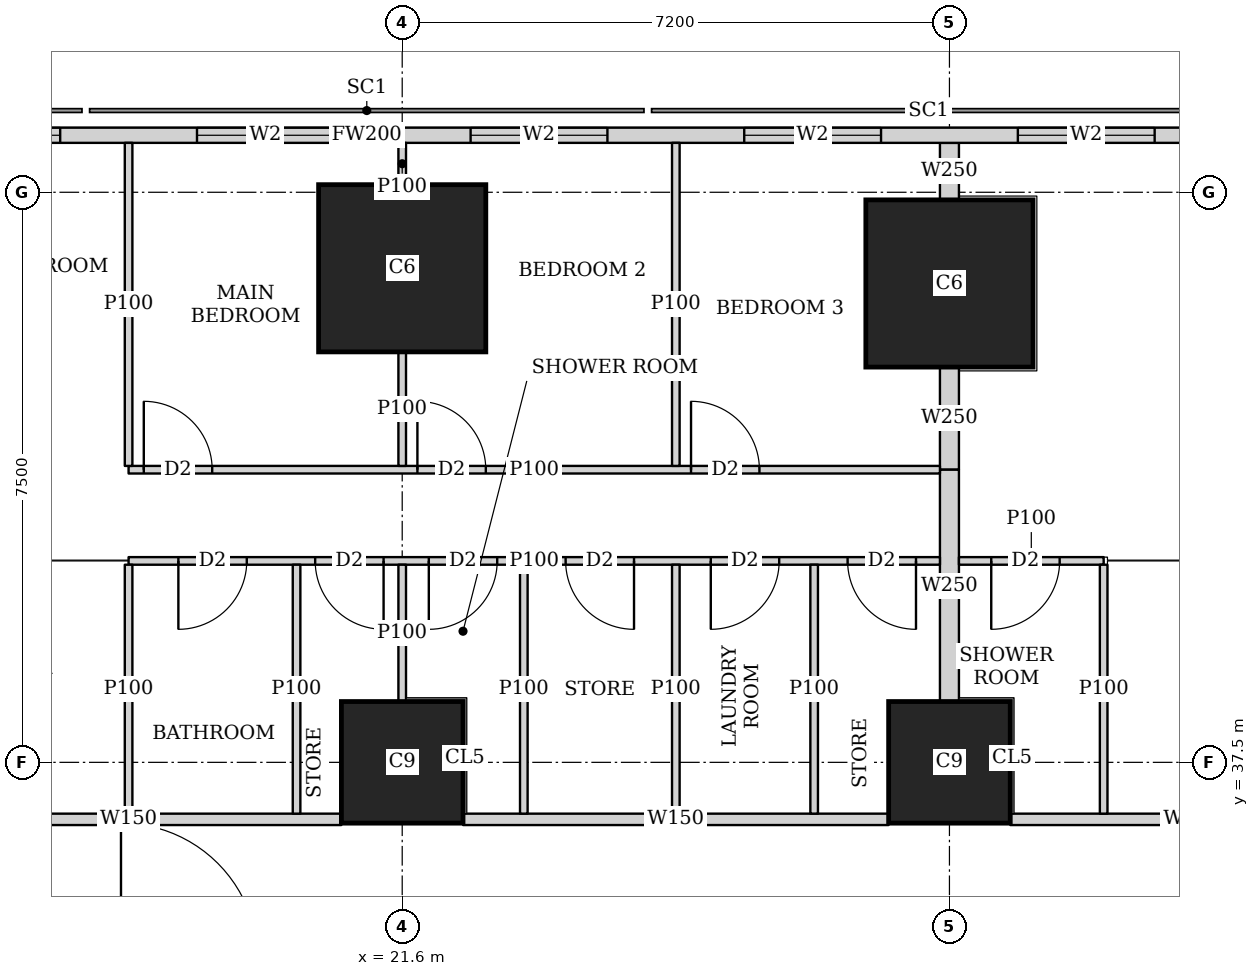
"""IFC4 building model, lengths in metres.
Left out: names, types, materials, properties, quantities, classifications, styles, units other than length and angle.
Written with IfcOpenShell. Run it as: python <this file> out.ifc"""

import sys

from ifc_helpers import new_model, si_unit, direction, frame, frame_2d, origin, origin_2d, place, context, subcontext, project, spatial, rectangle, extrude, element, fill, save


model = new_model("IFC4")
c1 = context("Model", 3, precision=1e-05, world=origin(), true_north=direction((0.0, 1.0)))
c2 = subcontext(c1, "Body", "Model", "MODEL_VIEW")
j1 = project(units=[si_unit("LENGTHUNIT", "METRE"), si_unit("PLANEANGLEUNIT", "RADIAN")], contexts=[c1])
p1 = place(None, origin())
s1 = spatial("IfcSite", under=j1, at=p1, CompositionType="ELEMENT")
p2 = place(p1, origin())
s2 = spatial("IfcBuilding", under=s1, at=p2, CompositionType="ELEMENT")
p3 = place(p2, frame((0.0, 0.0, 81.65)))
s3 = spatial("IfcBuildingStorey", under=s2, at=p3, CompositionType="ELEMENT", Elevation=81.65)
for number, where, z_axis, x_axis in (
    (1, (21.6, 37.5, 0.0), (0.0, 0.0, 1.0), (1.0, 0.0, 0.0)),
    (2, (28.8, 37.5, 0.0), (0.0, 0.0, 1.0), (1.0, 0.0, 0.0)),
):
    element("IfcColumn", number, at=place(p3, frame(where, z_axis=z_axis, x_axis=x_axis)), inside=s3, PredefinedType="COLUMN", context=c2, shape_type="SweptSolid", body=[
        extrude(rectangle(XDim=1.6, YDim=1.6, at=origin_2d()), origin(), (0.0, 0.0, 1.0), 3.75),
    ])
for number, where, z_axis, x_axis in (
    (3, (21.6, 44.0, 0.0), (0.0, 0.0, 1.0), (1.0, 0.0, 0.0)),
    (4, (28.8, 43.8, 0.0), (0.0, 0.0, 1.0), (1.0, 0.0, 0.0)),
):
    element("IfcColumn", number, at=place(p3, frame(where, z_axis=z_axis, x_axis=x_axis)), inside=s3, PredefinedType="COLUMN", context=c2, shape_type="SweptSolid", body=[
        extrude(rectangle(XDim=2.2, YDim=2.2, at=origin_2d()), origin(), (0.0, 0.0, 1.0), 3.75),
    ])
p4 = place(p3, frame((40.106, 45.75, 0.0), z_axis=(0.0, 0.0, 1.0), x_axis=(-1.0, 0.0, 0.0)))
e5 = element("IfcWall", 5, at=p4, inside=s3, PredefinedType="SOLIDWALL", context=c2, shape_type="SweptSolid", body=[
    extrude(rectangle(XDim=37.943, YDim=0.2, at=frame_2d((18.971, 0.0))), origin(), (0.0, 0.0, 1.0), 3.5),
])
p5 = place(p4, frame((8.606, 0.0, 0.9)))
e6 = element("IfcOpeningElement", 6, at=p5, cuts=e5, PredefinedType="OPENING", context=c2, shape_type="SweptSolid", body=[
    extrude(rectangle(XDim=1.8, YDim=1.5, at=frame_2d((0.9, 0.75))), frame((0.0, 0.11, 0.0), z_axis=(0.0, -1.0, 0.0), x_axis=(1.0, 0.0, 0.0)), (0.0, 0.0, 1.0), 0.22),
])
p6 = place(p4, frame((12.206, 0.0, 0.9)))
e7 = element("IfcOpeningElement", 7, at=p6, cuts=e5, PredefinedType="OPENING", context=c2, shape_type="SweptSolid", body=[
    extrude(rectangle(XDim=1.8, YDim=1.5, at=frame_2d((0.9, 0.75))), frame((0.0, 0.11, 0.0), z_axis=(0.0, -1.0, 0.0), x_axis=(1.0, 0.0, 0.0)), (0.0, 0.0, 1.0), 0.22),
])
p7 = place(p4, frame((15.806, 0.0, 0.9)))
e8 = element("IfcOpeningElement", 8, at=p7, cuts=e5, PredefinedType="OPENING", context=c2, shape_type="SweptSolid", body=[
    extrude(rectangle(XDim=1.8, YDim=1.5, at=frame_2d((0.9, 0.75))), frame((0.0, 0.11, 0.0), z_axis=(0.0, -1.0, 0.0), x_axis=(1.0, 0.0, 0.0)), (0.0, 0.0, 1.0), 0.22),
])
p8 = place(p4, frame((19.406, 0.0, 0.9)))
e9 = element("IfcOpeningElement", 9, at=p8, cuts=e5, PredefinedType="OPENING", context=c2, shape_type="SweptSolid", body=[
    extrude(rectangle(XDim=1.8, YDim=1.5, at=frame_2d((0.9, 0.75))), frame((0.0, 0.11, 0.0), z_axis=(0.0, -1.0, 0.0), x_axis=(1.0, 0.0, 0.0)), (0.0, 0.0, 1.0), 0.22),
])
p9 = place(p4, frame((23.006, 0.0, 0.9)))
e10 = element("IfcOpeningElement", 10, at=p9, cuts=e5, PredefinedType="OPENING", context=c2, shape_type="SweptSolid", body=[
    extrude(rectangle(XDim=1.8, YDim=1.5, at=frame_2d((0.9, 0.75))), frame((0.0, 0.11, 0.0), z_axis=(0.0, -1.0, 0.0), x_axis=(1.0, 0.0, 0.0)), (0.0, 0.0, 1.0), 0.22),
])
p10 = place(p4, frame((26.606, 0.0, 0.9)))
e11 = element("IfcOpeningElement", 11, at=p10, cuts=e5, PredefinedType="OPENING", context=c2, shape_type="SweptSolid", body=[
    extrude(rectangle(XDim=1.8, YDim=1.5, at=frame_2d((0.9, 0.75))), frame((0.0, 0.11, 0.0), z_axis=(0.0, -1.0, 0.0), x_axis=(1.0, 0.0, 0.0)), (0.0, 0.0, 1.0), 0.22),
])
p11 = place(p3, frame((15.201, 36.75, 0.0), z_axis=(0.0, 0.0, 1.0), x_axis=(1.0, 0.0, 0.0)))
e12 = element("IfcWall", 12, at=p11, inside=s3, PredefinedType="SOLIDWALL", context=c2, shape_type="SweptSolid", body=[
    extrude(rectangle(XDim=5.598, YDim=0.15, at=frame_2d((2.799, 0.0))), origin(), (0.0, 0.0, 1.0), 3.5),
])
p12 = place(p11, frame((0.699, 0.0, 0.0)))
e13 = element("IfcOpeningElement", 13, at=p12, cuts=e12, PredefinedType="OPENING", context=c2, shape_type="SweptSolid", body=[
    extrude(rectangle(XDim=1.0, YDim=2.1, at=frame_2d((0.5, 1.05))), frame((0.0, 0.085, 0.0), z_axis=(0.0, -1.0, 0.0), x_axis=(1.0, 0.0, 0.0)), (0.0, 0.0, 1.0), 0.17),
])
p13 = place(p3, frame((22.401, 36.75, 0.0), z_axis=(0.0, 0.0, 1.0), x_axis=(1.0, 0.0, 0.0)))
e14 = element("IfcWall", 14, at=p13, inside=s3, PredefinedType="SOLIDWALL", context=c2, shape_type="SweptSolid", body=[
    extrude(rectangle(XDim=5.598, YDim=0.15, at=frame_2d((2.799, 0.0))), origin(), (0.0, 0.0, 1.0), 3.5),
])
p14 = place(p3, frame((29.601, 36.75, 0.0), z_axis=(0.0, 0.0, 1.0), x_axis=(1.0, 0.0, 0.0)))
e15 = element("IfcWall", 15, at=p14, inside=s3, PredefinedType="SOLIDWALL", context=c2, shape_type="SweptSolid", body=[
    extrude(rectangle(XDim=5.372, YDim=0.15, at=frame_2d((2.686, 0.0))), origin(), (0.0, 0.0, 1.0), 3.5),
])
p15 = place(p14, frame((2.845, 0.0, 0.0)))
e16 = element("IfcOpeningElement", 16, at=p15, cuts=e15, PredefinedType="OPENING", context=c2, shape_type="SweptSolid", body=[
    extrude(rectangle(XDim=1.0, YDim=2.1, at=frame_2d((0.5, 1.05))), frame((0.0, 0.085, 0.0), z_axis=(0.0, -1.0, 0.0), x_axis=(1.0, 0.0, 0.0)), (0.0, 0.0, 1.0), 0.17),
])
p16 = place(p3, frame((18.0, 41.35, 0.0), z_axis=(0.0, 0.0, 1.0), x_axis=(1.0, 0.0, 0.0)))
e17 = element("IfcWall", 17, at=p16, inside=s3, PredefinedType="PARTITIONING", context=c2, shape_type="SweptSolid", body=[
    extrude(rectangle(XDim=10.675, YDim=0.1, at=frame_2d((5.337, 0.0))), origin(), (0.0, 0.0, 1.0), 3.5),
])
p17 = place(p16, frame((0.2, 0.0, 0.0)))
e18 = element("IfcOpeningElement", 18, at=p17, cuts=e17, PredefinedType="OPENING", context=c2, shape_type="SweptSolid", body=[
    extrude(rectangle(XDim=0.9, YDim=2.1, at=frame_2d((0.45, 1.05))), frame((0.0, 0.06, 0.0), z_axis=(0.0, -1.0, 0.0), x_axis=(1.0, 0.0, 0.0)), (0.0, 0.0, 1.0), 0.12),
])
p18 = place(p16, frame((3.8, 0.0, 0.0)))
e19 = element("IfcOpeningElement", 19, at=p18, cuts=e17, PredefinedType="OPENING", context=c2, shape_type="SweptSolid", body=[
    extrude(rectangle(XDim=0.9, YDim=2.1, at=frame_2d((0.45, 1.05))), frame((0.0, 0.06, 0.0), z_axis=(0.0, -1.0, 0.0), x_axis=(1.0, 0.0, 0.0)), (0.0, 0.0, 1.0), 0.12),
])
p19 = place(p16, frame((7.4, 0.0, 0.0)))
e20 = element("IfcOpeningElement", 20, at=p19, cuts=e17, PredefinedType="OPENING", context=c2, shape_type="SweptSolid", body=[
    extrude(rectangle(XDim=0.9, YDim=2.1, at=frame_2d((0.45, 1.05))), frame((0.0, 0.06, 0.0), z_axis=(0.0, -1.0, 0.0), x_axis=(1.0, 0.0, 0.0)), (0.0, 0.0, 1.0), 0.12),
])
p20 = place(p3, frame((18.0, 40.15, 0.0), z_axis=(0.0, 0.0, 1.0), x_axis=(1.0, 0.0, 0.0)))
e21 = element("IfcWall", 21, at=p20, inside=s3, PredefinedType="PARTITIONING", context=c2, shape_type="SweptSolid", body=[
    extrude(rectangle(XDim=10.675, YDim=0.1, at=frame_2d((5.337, 0.0))), origin(), (0.0, 0.0, 1.0), 3.5),
])
p21 = place(p20, frame((0.655, 0.0, 0.0)))
e22 = element("IfcOpeningElement", 22, at=p21, cuts=e21, PredefinedType="OPENING", context=c2, shape_type="SweptSolid", body=[
    extrude(rectangle(XDim=0.9, YDim=2.1, at=frame_2d((0.45, 1.05))), frame((0.0, 0.06, 0.0), z_axis=(0.0, -1.0, 0.0), x_axis=(1.0, 0.0, 0.0)), (0.0, 0.0, 1.0), 0.12),
])
p22 = place(p20, frame((3.95, 0.0, 0.0)))
e23 = element("IfcOpeningElement", 23, at=p22, cuts=e21, PredefinedType="OPENING", context=c2, shape_type="SweptSolid", body=[
    extrude(rectangle(XDim=0.9, YDim=2.1, at=frame_2d((0.45, 1.05))), frame((0.0, 0.06, 0.0), z_axis=(0.0, -1.0, 0.0), x_axis=(1.0, 0.0, 0.0)), (0.0, 0.0, 1.0), 0.12),
])
p23 = place(p20, frame((7.66, 0.0, 0.0)))
e24 = element("IfcOpeningElement", 24, at=p23, cuts=e21, PredefinedType="OPENING", context=c2, shape_type="SweptSolid", body=[
    extrude(rectangle(XDim=0.9, YDim=2.1, at=frame_2d((0.45, 1.05))), frame((0.0, 0.06, 0.0), z_axis=(0.0, -1.0, 0.0), x_axis=(1.0, 0.0, 0.0)), (0.0, 0.0, 1.0), 0.12),
])
p24 = place(p20, frame((2.455, 0.0, 0.0)))
e25 = element("IfcOpeningElement", 25, at=p24, cuts=e21, PredefinedType="OPENING", context=c2, shape_type="SweptSolid", body=[
    extrude(rectangle(XDim=0.9, YDim=2.1, at=frame_2d((0.45, 1.05))), frame((0.0, 0.06, 0.0), z_axis=(0.0, -1.0, 0.0), x_axis=(1.0, 0.0, 0.0)), (0.0, 0.0, 1.0), 0.12),
])
p25 = place(p20, frame((5.75, 0.0, 0.0)))
e26 = element("IfcOpeningElement", 26, at=p25, cuts=e21, PredefinedType="OPENING", context=c2, shape_type="SweptSolid", body=[
    extrude(rectangle(XDim=0.9, YDim=2.1, at=frame_2d((0.45, 1.05))), frame((0.0, 0.06, 0.0), z_axis=(0.0, -1.0, 0.0), x_axis=(1.0, 0.0, 0.0)), (0.0, 0.0, 1.0), 0.12),
])
p26 = place(p20, frame((9.46, 0.0, 0.0)))
e27 = element("IfcOpeningElement", 27, at=p26, cuts=e21, PredefinedType="OPENING", context=c2, shape_type="SweptSolid", body=[
    extrude(rectangle(XDim=0.9, YDim=2.1, at=frame_2d((0.45, 1.05))), frame((0.0, 0.06, 0.0), z_axis=(0.0, -1.0, 0.0), x_axis=(1.0, 0.0, 0.0)), (0.0, 0.0, 1.0), 0.12),
])
p27 = place(p3, frame((18.0, 41.4, 0.0), z_axis=(0.0, 0.0, 1.0), x_axis=(0.0, 1.0, 0.0)))
e28 = element("IfcWall", 28, at=p27, inside=s3, PredefinedType="PARTITIONING", context=c2, shape_type="SweptSolid", body=[
    extrude(rectangle(XDim=4.25, YDim=0.1, at=frame_2d((2.125, 0.0))), origin(), (0.0, 0.0, 1.0), 2.2),
])
p28 = place(p3, frame((21.6, 41.4, 0.0), z_axis=(0.0, 0.0, 1.0), x_axis=(0.0, 1.0, 0.0)))
e29 = element("IfcWall", 29, at=p28, inside=s3, PredefinedType="PARTITIONING", context=c2, shape_type="SweptSolid", body=[
    extrude(rectangle(XDim=1.499, YDim=0.1, at=frame_2d((0.75, 0.0))), origin(), (0.0, 0.0, 1.0), 3.5),
])
p29 = place(p3, frame((21.6, 45.101, 0.0), z_axis=(0.0, 0.0, 1.0), x_axis=(0.0, 1.0, 0.0)))
e30 = element("IfcWall", 30, at=p29, inside=s3, PredefinedType="PARTITIONING", context=c2, shape_type="SweptSolid", body=[
    extrude(rectangle(XDim=0.549, YDim=0.1, at=frame_2d((0.274, 0.0))), origin(), (0.0, 0.0, 1.0), 3.5),
])
p30 = place(p3, frame((25.2, 41.4, 0.0), z_axis=(0.0, 0.0, 1.0), x_axis=(0.0, 1.0, 0.0)))
e31 = element("IfcWall", 31, at=p30, inside=s3, PredefinedType="PARTITIONING", context=c2, shape_type="SweptSolid", body=[
    extrude(rectangle(XDim=4.25, YDim=0.1, at=frame_2d((2.125, 0.0))), origin(), (0.0, 0.0, 1.0), 2.2),
])
p31 = place(p3, frame((18.0, 36.825, 0.0), z_axis=(0.0, 0.0, 1.0), x_axis=(0.0, 1.0, 0.0)))
e32 = element("IfcWall", 32, at=p31, inside=s3, PredefinedType="PARTITIONING", context=c2, shape_type="SweptSolid", body=[
    extrude(rectangle(XDim=3.275, YDim=0.1, at=frame_2d((1.638, 0.0))), origin(), (0.0, 0.0, 1.0), 3.5),
])
p32 = place(p3, frame((21.6, 38.301, 0.0), z_axis=(0.0, 0.0, 1.0), x_axis=(0.0, 1.0, 0.0)))
e33 = element("IfcWall", 33, at=p32, inside=s3, PredefinedType="PARTITIONING", context=c2, shape_type="SweptSolid", body=[
    extrude(rectangle(XDim=1.799, YDim=0.1, at=frame_2d((0.899, 0.0))), origin(), (0.0, 0.0, 1.0), 3.5),
])
for number, where, z_axis, x_axis in (
    (34, (25.2, 36.825, 0.0), (0.0, 0.0, 1.0), (0.0, 1.0, 0.0)),
    (35, (20.21, 36.825, 0.0), (0.0, 0.0, 1.0), (0.0, 1.0, 0.0)),
    (36, (23.2, 36.825, 0.0), (0.0, 0.0, 1.0), (0.0, 1.0, 0.0)),
    (37, (27.02, 36.825, 0.0), (0.0, 0.0, 1.0), (0.0, 1.0, 0.0)),
):
    element("IfcWall", number, at=place(p3, frame(where, z_axis=z_axis, x_axis=x_axis)), inside=s3, PredefinedType="PARTITIONING", context=c2, shape_type="SweptSolid", body=[
        extrude(rectangle(XDim=3.275, YDim=0.1, at=frame_2d((1.638, 0.0))), origin(), (0.0, 0.0, 1.0), 3.5),
    ])
p33 = place(p3, frame((28.925, 40.15, 0.0), z_axis=(0.0, 0.0, 1.0), x_axis=(1.0, 0.0, 0.0)))
e38 = element("IfcWall", 38, at=p33, inside=s3, PredefinedType="PARTITIONING", context=c2, shape_type="SweptSolid", body=[
    extrude(rectangle(XDim=1.904, YDim=0.1, at=frame_2d((0.952, 0.0))), origin(), (0.0, 0.0, 1.0), 3.5),
])
p34 = place(p33, frame((0.425, 0.0, 0.0)))
e39 = element("IfcOpeningElement", 39, at=p34, cuts=e38, PredefinedType="OPENING", context=c2, shape_type="SweptSolid", body=[
    extrude(rectangle(XDim=0.9, YDim=2.1, at=frame_2d((0.45, 1.05))), frame((0.0, 0.06, 0.0), z_axis=(0.0, -1.0, 0.0), x_axis=(1.0, 0.0, 0.0)), (0.0, 0.0, 1.0), 0.12),
])
p35 = place(p3, frame((30.829, 36.825, 0.0), z_axis=(0.0, 0.0, 1.0), x_axis=(0.0, 1.0, 0.0)))
e40 = element("IfcWall", 40, at=p35, inside=s3, PredefinedType="PARTITIONING", context=c2, shape_type="SweptSolid", body=[
    extrude(rectangle(XDim=3.275, YDim=0.1, at=frame_2d((1.638, 0.0))), origin(), (0.0, 0.0, 1.0), 3.5),
])
p36 = place(p3, frame((28.8, 41.35, 0.0), z_axis=(0.0, 0.0, 1.0), x_axis=(0.0, 1.0, 0.0)))
e41 = element("IfcWall", 41, at=p36, inside=s3, PredefinedType="SOLIDWALL", context=c2, shape_type="SweptSolid", body=[
    extrude(rectangle(XDim=1.349, YDim=0.25, at=frame_2d((0.674, 0.0))), origin(), (0.0, 0.0, 1.0), 3.5),
])
p37 = place(p3, frame((28.8, 44.901, 0.0), z_axis=(0.0, 0.0, 1.0), x_axis=(0.0, 1.0, 0.0)))
e42 = element("IfcWall", 42, at=p37, inside=s3, PredefinedType="SOLIDWALL", context=c2, shape_type="SweptSolid", body=[
    extrude(rectangle(XDim=0.749, YDim=0.25, at=frame_2d((0.375, 0.0))), origin(), (0.0, 0.0, 1.0), 3.5),
])
p38 = place(p3, frame((28.8, 38.301, 0.0), z_axis=(0.0, 0.0, 1.0), x_axis=(0.0, 1.0, 0.0)))
e43 = element("IfcWall", 43, at=p38, inside=s3, PredefinedType="SOLIDWALL", context=c2, shape_type="SweptSolid", body=[
    extrude(rectangle(XDim=3.049, YDim=0.25, at=frame_2d((1.524, 0.0))), origin(), (0.0, 0.0, 1.0), 3.5),
])
p39 = place(p5, origin())
e44 = element("IfcWindow", 44, at=p39, inside=s3, PartitioningType="SINGLE_PANEL", PredefinedType="WINDOW", context=c2, shape_type="SweptSolid", body=[
    extrude(rectangle(XDim=1.8, YDim=1.5, at=frame_2d((0.9, 0.75))), frame((0.0, 0.03, 0.0), z_axis=(0.0, -1.0, 0.0), x_axis=(1.0, 0.0, 0.0)), (0.0, 0.0, 1.0), 0.06),
])
fill(e6, e44)
p40 = place(p6, origin())
e45 = element("IfcWindow", 45, at=p40, inside=s3, PartitioningType="SINGLE_PANEL", PredefinedType="WINDOW", context=c2, shape_type="SweptSolid", body=[
    extrude(rectangle(XDim=1.8, YDim=1.5, at=frame_2d((0.9, 0.75))), frame((0.0, 0.03, 0.0), z_axis=(0.0, -1.0, 0.0), x_axis=(1.0, 0.0, 0.0)), (0.0, 0.0, 1.0), 0.06),
])
fill(e7, e45)
p41 = place(p7, origin())
e46 = element("IfcWindow", 46, at=p41, inside=s3, PartitioningType="SINGLE_PANEL", PredefinedType="WINDOW", context=c2, shape_type="SweptSolid", body=[
    extrude(rectangle(XDim=1.8, YDim=1.5, at=frame_2d((0.9, 0.75))), frame((0.0, 0.03, 0.0), z_axis=(0.0, -1.0, 0.0), x_axis=(1.0, 0.0, 0.0)), (0.0, 0.0, 1.0), 0.06),
])
fill(e8, e46)
p42 = place(p8, origin())
e47 = element("IfcWindow", 47, at=p42, inside=s3, PartitioningType="SINGLE_PANEL", PredefinedType="WINDOW", context=c2, shape_type="SweptSolid", body=[
    extrude(rectangle(XDim=1.8, YDim=1.5, at=frame_2d((0.9, 0.75))), frame((0.0, 0.03, 0.0), z_axis=(0.0, -1.0, 0.0), x_axis=(1.0, 0.0, 0.0)), (0.0, 0.0, 1.0), 0.06),
])
fill(e9, e47)
p43 = place(p9, origin())
e48 = element("IfcWindow", 48, at=p43, inside=s3, PartitioningType="SINGLE_PANEL", PredefinedType="WINDOW", context=c2, shape_type="SweptSolid", body=[
    extrude(rectangle(XDim=1.8, YDim=1.5, at=frame_2d((0.9, 0.75))), frame((0.0, 0.03, 0.0), z_axis=(0.0, -1.0, 0.0), x_axis=(1.0, 0.0, 0.0)), (0.0, 0.0, 1.0), 0.06),
])
fill(e10, e48)
p44 = place(p17, origin())
e49 = element("IfcDoor", 49, at=p44, inside=s3, OperationType="SINGLE_SWING_LEFT", PredefinedType="DOOR", context=c2, shape_type="SweptSolid", body=[
    extrude(rectangle(XDim=0.9, YDim=2.1, at=frame_2d((0.45, 1.05))), frame((0.0, 0.025, 0.0), z_axis=(0.0, -1.0, 0.0), x_axis=(1.0, 0.0, 0.0)), (0.0, 0.0, 1.0), 0.05),
])
fill(e18, e49)
p45 = place(p18, origin())
e50 = element("IfcDoor", 50, at=p45, inside=s3, OperationType="SINGLE_SWING_LEFT", PredefinedType="DOOR", context=c2, shape_type="SweptSolid", body=[
    extrude(rectangle(XDim=0.9, YDim=2.1, at=frame_2d((0.45, 1.05))), frame((0.0, 0.025, 0.0), z_axis=(0.0, -1.0, 0.0), x_axis=(1.0, 0.0, 0.0)), (0.0, 0.0, 1.0), 0.05),
])
fill(e19, e50)
p46 = place(p19, origin())
e51 = element("IfcDoor", 51, at=p46, inside=s3, OperationType="SINGLE_SWING_LEFT", PredefinedType="DOOR", context=c2, shape_type="SweptSolid", body=[
    extrude(rectangle(XDim=0.9, YDim=2.1, at=frame_2d((0.45, 1.05))), frame((0.0, 0.025, 0.0), z_axis=(0.0, -1.0, 0.0), x_axis=(1.0, 0.0, 0.0)), (0.0, 0.0, 1.0), 0.05),
])
fill(e20, e51)
p47 = place(p21, origin())
e52 = element("IfcDoor", 52, at=p47, inside=s3, OperationType="SINGLE_SWING_RIGHT", PredefinedType="DOOR", context=c2, shape_type="SweptSolid", body=[
    extrude(rectangle(XDim=0.9, YDim=2.1, at=frame_2d((0.45, 1.05))), frame((0.0, 0.025, 0.0), z_axis=(0.0, -1.0, 0.0), x_axis=(1.0, 0.0, 0.0)), (0.0, 0.0, 1.0), 0.05),
])
fill(e22, e52)
p48 = place(p22, origin())
e53 = element("IfcDoor", 53, at=p48, inside=s3, OperationType="SINGLE_SWING_RIGHT", PredefinedType="DOOR", context=c2, shape_type="SweptSolid", body=[
    extrude(rectangle(XDim=0.9, YDim=2.1, at=frame_2d((0.45, 1.05))), frame((0.0, 0.025, 0.0), z_axis=(0.0, -1.0, 0.0), x_axis=(1.0, 0.0, 0.0)), (0.0, 0.0, 1.0), 0.05),
])
fill(e23, e53)
p49 = place(p23, origin())
e54 = element("IfcDoor", 54, at=p49, inside=s3, OperationType="SINGLE_SWING_RIGHT", PredefinedType="DOOR", context=c2, shape_type="SweptSolid", body=[
    extrude(rectangle(XDim=0.9, YDim=2.1, at=frame_2d((0.45, 1.05))), frame((0.0, 0.025, 0.0), z_axis=(0.0, -1.0, 0.0), x_axis=(1.0, 0.0, 0.0)), (0.0, 0.0, 1.0), 0.05),
])
fill(e24, e54)
p50 = place(p24, origin())
e55 = element("IfcDoor", 55, at=p50, inside=s3, OperationType="SINGLE_SWING_LEFT", PredefinedType="DOOR", context=c2, shape_type="SweptSolid", body=[
    extrude(rectangle(XDim=0.9, YDim=2.1, at=frame_2d((0.45, 1.05))), frame((0.0, 0.025, 0.0), z_axis=(0.0, -1.0, 0.0), x_axis=(1.0, 0.0, 0.0)), (0.0, 0.0, 1.0), 0.05),
])
fill(e25, e55)
p51 = place(p25, origin())
e56 = element("IfcDoor", 56, at=p51, inside=s3, OperationType="SINGLE_SWING_LEFT", PredefinedType="DOOR", context=c2, shape_type="SweptSolid", body=[
    extrude(rectangle(XDim=0.9, YDim=2.1, at=frame_2d((0.45, 1.05))), frame((0.0, 0.025, 0.0), z_axis=(0.0, -1.0, 0.0), x_axis=(1.0, 0.0, 0.0)), (0.0, 0.0, 1.0), 0.05),
])
fill(e26, e56)
p52 = place(p26, origin())
e57 = element("IfcDoor", 57, at=p52, inside=s3, OperationType="SINGLE_SWING_LEFT", PredefinedType="DOOR", context=c2, shape_type="SweptSolid", body=[
    extrude(rectangle(XDim=0.9, YDim=2.1, at=frame_2d((0.45, 1.05))), frame((0.0, 0.025, 0.0), z_axis=(0.0, -1.0, 0.0), x_axis=(1.0, 0.0, 0.0)), (0.0, 0.0, 1.0), 0.05),
])
fill(e27, e57)
p53 = place(p34, origin())
e58 = element("IfcDoor", 58, at=p53, inside=s3, OperationType="SINGLE_SWING_RIGHT", PredefinedType="DOOR", context=c2, shape_type="SweptSolid", body=[
    extrude(rectangle(XDim=0.9, YDim=2.1, at=frame_2d((0.45, 1.05))), frame((0.0, 0.025, 0.0), z_axis=(0.0, -1.0, 0.0), x_axis=(1.0, 0.0, 0.0)), (0.0, 0.0, 1.0), 0.05),
])
fill(e39, e58)
save(model, sys.argv[1])
